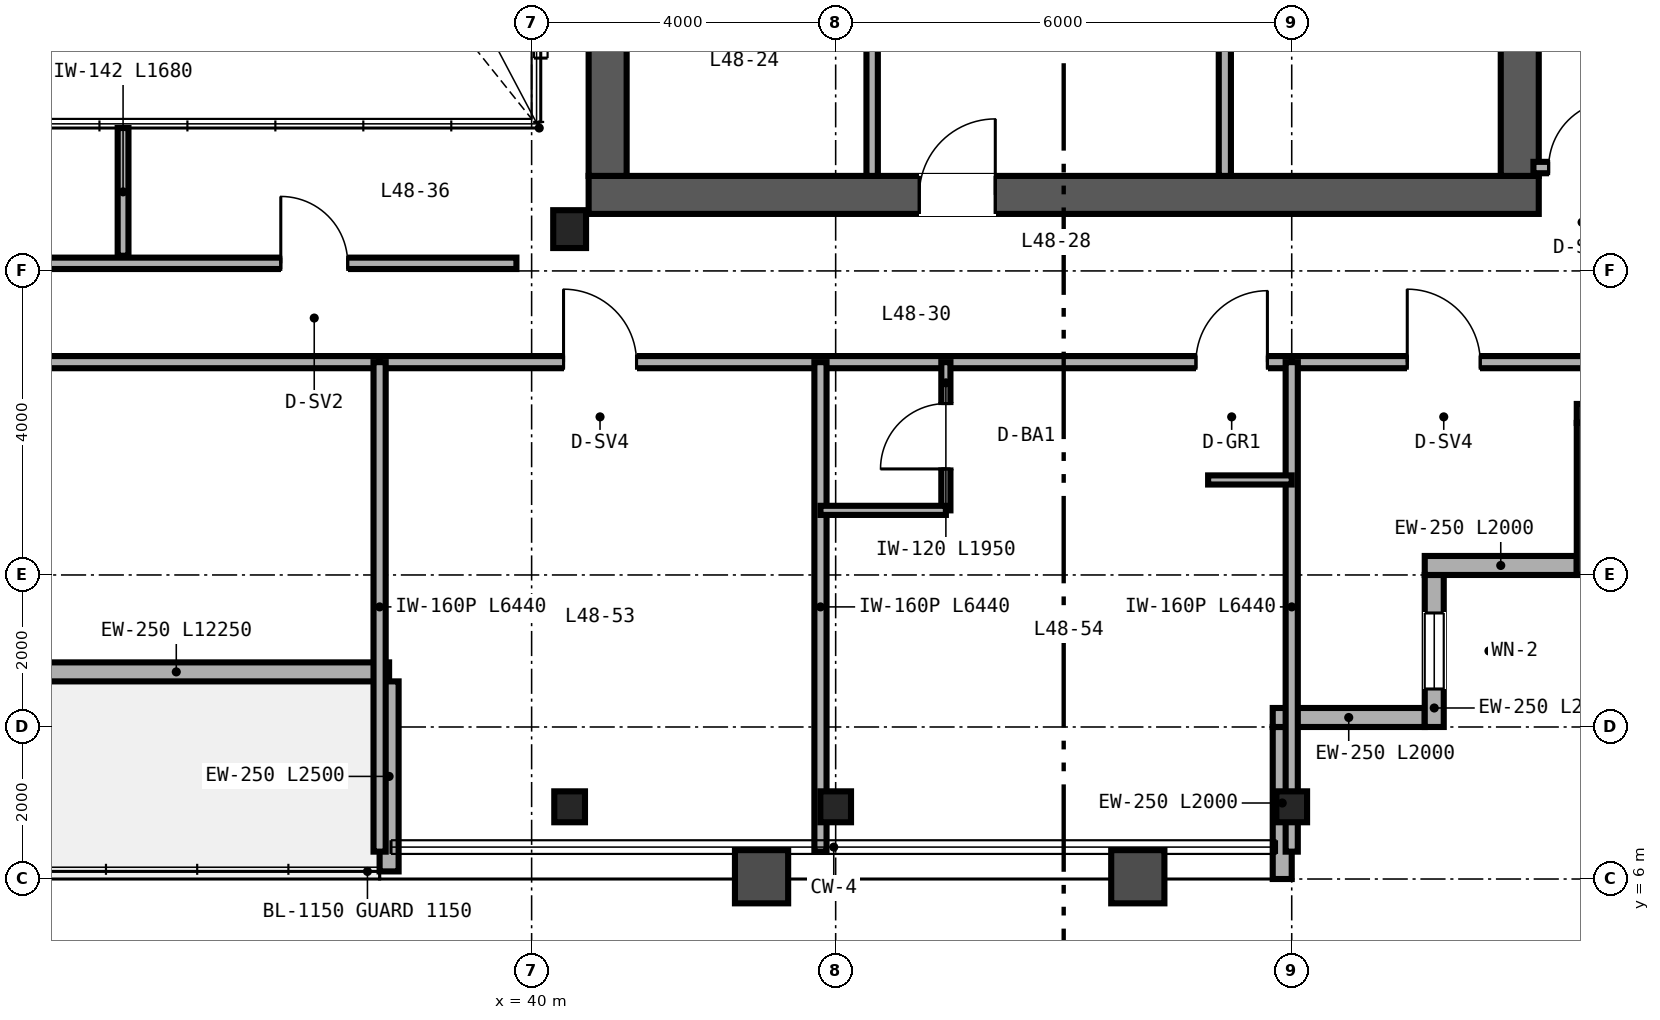
"""IFC4 building model, lengths in metres.
Left out: names, types, materials, properties, quantities, classifications, styles, units other than length and angle.
Written with IfcOpenShell. Run it as: python <this file> out.ifc"""

import sys

from ifc_helpers import new_model, si_unit, direction, frame, frame_2d, origin, origin_2d, place, context, subcontext, project, spatial, rectangle, i_section, extrude, source, transform, mapped, element, fill, save


model = new_model("IFC4")
c1 = context("Model", 3, precision=1e-05, world=origin(), true_north=direction((0.0, 1.0)))
c2 = subcontext(c1, "Body", "Model", "MODEL_VIEW")
j1 = project(units=[si_unit("LENGTHUNIT", "METRE"), si_unit("PLANEANGLEUNIT", "RADIAN")], contexts=[c1])
p1 = place(None, origin())
s1 = spatial("IfcSite", under=j1, at=p1, CompositionType="ELEMENT")
p2 = place(p1, origin())
s2 = spatial("IfcBuilding", under=s1, at=p2, CompositionType="ELEMENT")
p3 = place(p2, frame((0.0, 0.0, 192.0)))
s3 = spatial("IfcBuildingStorey", under=s2, at=p3, CompositionType="ELEMENT", Elevation=192.0)
p4 = place(p3, frame((40.75, 15.0, 0.0), z_axis=(0.0, 0.0, 1.0), x_axis=(1.0, 0.0, 0.0)))
e1 = element("IfcWall", 1, at=p4, inside=s3, PredefinedType="SHEAR", context=c2, shape_type="SweptSolid", body=[
    extrude(rectangle(XDim=12.5, YDim=0.5, at=frame_2d((6.25, 0.0))), origin(), (0.0, 0.0, 1.0), 3.37),
])
p5 = place(p4, frame((4.35, 0.0, 0.0)))
e2 = element("IfcOpeningElement", 2, at=p5, cuts=e1, PredefinedType="OPENING", context=c2, shape_type="SweptSolid", body=[
    extrude(rectangle(XDim=1.0, YDim=2.15, at=frame_2d((0.5, 1.075))), frame((0.0, 0.26, 0.0), z_axis=(0.0, -1.0, 0.0), x_axis=(1.0, 0.0, 0.0)), (0.0, 0.0, 1.0), 0.52),
])
for number, where, z_axis, x_axis in (
    (3, (41.0, 15.25, 0.0), (0.0, 0.0, 1.0), (0.0, 1.0, 0.0)),
    (4, (53.0, 15.25, 0.0), (0.0, 0.0, 1.0), (0.0, 1.0, 0.0)),
):
    element("IfcWall", number, at=place(p3, frame(where, z_axis=z_axis, x_axis=x_axis)), inside=s3, PredefinedType="SHEAR", context=c2, shape_type="SweptSolid", body=[
        extrude(rectangle(XDim=21.5, YDim=0.5, at=frame_2d((10.75, 0.0))), origin(), (0.0, 0.0, 1.0), 3.37),
    ])
m1 = source(origin(), c2, "Body", "SweptSolid", [
    extrude(i_section(OverallWidth=0.432, OverallDepth=0.498, WebThickness=0.056, FlangeThickness=0.089, FilletRadius=0.025, at=origin_2d()), origin(), (0.0, 0.0, 1.0), 3.37),
])
p6 = place(p3, frame((40.5, 14.55, 0.0), z_axis=(0.0, 0.0, 1.0), x_axis=(1.0, 0.0, 0.0)))
e5 = element("IfcColumn", 5, at=p6, inside=s3, PredefinedType="COLUMN", context=c2, shape_type="MappedRepresentation", body=[
    mapped(m1, transform((0.0, 0.0, 0.0), scale=1.0)),
])
m2 = source(origin(), c2, "Body", "SweptSolid", [
    extrude(i_section(OverallWidth=0.404, OverallDepth=0.407, WebThickness=0.027, FlangeThickness=0.044, FilletRadius=0.025, at=origin_2d()), origin(), (0.0, 0.0, 1.0), 3.37),
])
for number, where, z_axis, x_axis in (
    (6, (40.5, 6.95, 0.0), (0.0, 0.0, 1.0), (1.0, 0.0, 0.0)),
    (7, (44.0, 6.95, 0.0), (0.0, 0.0, 1.0), (1.0, 0.0, 0.0)),
    (8, (50.0, 6.95, 0.0), (0.0, 0.0, 1.0), (1.0, 0.0, 0.0)),
):
    element("IfcColumn", number, at=place(p3, frame(where, z_axis=z_axis, x_axis=x_axis)), inside=s3, PredefinedType="COLUMN", context=c2, shape_type="MappedRepresentation", body=[
        mapped(m2, transform((0.0, 0.0, 0.0), scale=1.0)),
    ])
p7 = place(p3, frame((49.875, 6.0, 0.0), z_axis=(0.0, 0.0, 1.0), x_axis=(0.0, 1.0, 0.0)))
e9 = element("IfcWall", 9, at=p7, inside=s3, PredefinedType="SOLIDWALL", context=c2, shape_type="SweptSolid", body=[
    extrude(rectangle(XDim=2.0, YDim=0.25, at=frame_2d((1.0, 0.0))), origin(), (0.0, 0.0, 1.0), 2.677),
])
p8 = place(p3, frame((49.75, 8.125, 0.0), z_axis=(0.0, 0.0, 1.0), x_axis=(1.0, 0.0, 0.0)))
e10 = element("IfcWall", 10, at=p8, inside=s3, PredefinedType="SOLIDWALL", context=c2, shape_type="SweptSolid", body=[
    extrude(rectangle(XDim=2.0, YDim=0.25, at=frame_2d((1.0, 0.0))), origin(), (0.0, 0.0, 1.0), 3.37),
])
p9 = place(p3, frame((51.875, 8.0, 0.0), z_axis=(0.0, 0.0, 1.0), x_axis=(0.0, 1.0, 0.0)))
e11 = element("IfcWall", 11, at=p9, inside=s3, PredefinedType="SOLIDWALL", context=c2, shape_type="SweptSolid", body=[
    extrude(rectangle(XDim=2.0, YDim=0.25, at=frame_2d((1.0, 0.0))), origin(), (0.0, 0.0, 1.0), 3.37),
])
p10 = place(p9, frame((0.5, 0.0, 0.85)))
e12 = element("IfcOpeningElement", 12, at=p10, cuts=e11, PredefinedType="OPENING", context=c2, shape_type="SweptSolid", body=[
    extrude(rectangle(XDim=1.0, YDim=1.9, at=frame_2d((0.5, 0.95))), frame((0.0, 0.135, 0.0), z_axis=(0.0, -1.0, 0.0), x_axis=(1.0, 0.0, 0.0)), (0.0, 0.0, 1.0), 0.27),
])
for number, where, z_axis, x_axis in (
    (13, (51.75, 10.125, 0.0), (0.0, 0.0, 1.0), (1.0, 0.0, 0.0)),
    (14, (53.875, 10.0, 0.0), (0.0, 0.0, 1.0), (0.0, 1.0, 0.0)),
):
    element("IfcWall", number, at=place(p3, frame(where, z_axis=z_axis, x_axis=x_axis)), inside=s3, PredefinedType="SOLIDWALL", context=c2, shape_type="SweptSolid", body=[
        extrude(rectangle(XDim=2.0, YDim=0.25, at=frame_2d((1.0, 0.0))), origin(), (0.0, 0.0, 1.0), 3.37),
    ])
p11 = place(p3, frame((53.75, 12.125, 0.0), z_axis=(0.0, 0.0, 1.0), x_axis=(1.0, 0.0, 0.0)))
e15 = element("IfcWall", 15, at=p11, inside=s3, PredefinedType="SOLIDWALL", context=c2, shape_type="SweptSolid", body=[
    extrude(rectangle(XDim=2.25, YDim=0.25, at=frame_2d((1.125, 0.0))), origin(), (0.0, 0.0, 1.0), 3.37),
])
p12 = place(p3, frame((25.875, 8.725, 0.0), z_axis=(0.0, 0.0, 1.0), x_axis=(1.0, 0.0, 0.0)))
e16 = element("IfcWall", 16, at=p12, inside=s3, PredefinedType="SOLIDWALL", context=c2, shape_type="SweptSolid", body=[
    extrude(rectangle(XDim=12.25, YDim=0.25, at=frame_2d((6.125, 0.0))), origin(), (0.0, 0.0, 1.0), 3.37),
])
p13 = place(p12, frame((5.6, 0.0, 0.0)))
e17 = element("IfcOpeningElement", 17, at=p13, cuts=e16, PredefinedType="OPENING", context=c2, shape_type="SweptSolid", body=[
    extrude(rectangle(XDim=1.05, YDim=2.15, at=frame_2d((0.525, 1.075))), frame((0.0, 0.135, 0.0), z_axis=(0.0, -1.0, 0.0), x_axis=(1.0, 0.0, 0.0)), (0.0, 0.0, 1.0), 0.27),
])
p14 = place(p3, frame((38.125, 6.1, 0.0), z_axis=(0.0, 0.0, 1.0), x_axis=(0.0, 1.0, 0.0)))
e18 = element("IfcWall", 18, at=p14, inside=s3, PredefinedType="SOLIDWALL", context=c2, shape_type="SweptSolid", body=[
    extrude(rectangle(XDim=2.5, YDim=0.25, at=frame_2d((1.25, 0.0))), origin(), (0.0, 0.0, 1.0), 2.443),
])
p15 = place(p3, frame((49.12, 15.25, 0.0), z_axis=(0.0, 0.0, 1.0), x_axis=(0.0, 1.0, 0.0)))
e19 = element("IfcWall", 19, at=p15, inside=s3, PredefinedType="PARTITIONING", context=c2, shape_type="SweptSolid", body=[
    extrude(rectangle(XDim=16.13, YDim=0.16, at=frame_2d((8.065, 0.0))), origin(), (0.0, 0.0, 1.0), 2.443),
])
p16 = place(p15, frame((2.2, 0.0, 0.0)))
e20 = element("IfcOpeningElement", 20, at=p16, cuts=e19, PredefinedType="OPENING", context=c2, shape_type="SweptSolid", body=[
    extrude(rectangle(XDim=0.9, YDim=2.15, at=frame_2d((0.45, 1.075))), frame((0.0, 0.09, 0.0), z_axis=(0.0, -1.0, 0.0), x_axis=(1.0, 0.0, 0.0)), (0.0, 0.0, 1.0), 0.18),
])
p17 = place(p15, frame((8.2, 0.0, 0.0)))
e21 = element("IfcOpeningElement", 21, at=p17, cuts=e19, PredefinedType="OPENING", context=c2, shape_type="SweptSolid", body=[
    extrude(rectangle(XDim=0.9, YDim=2.15, at=frame_2d((0.45, 1.075))), frame((0.0, 0.09, 0.0), z_axis=(0.0, -1.0, 0.0), x_axis=(1.0, 0.0, 0.0)), (0.0, 0.0, 1.0), 0.18),
])
p18 = place(p15, frame((13.5, 0.0, 0.0)))
e22 = element("IfcOpeningElement", 22, at=p18, cuts=e19, PredefinedType="OPENING", context=c2, shape_type="SweptSolid", body=[
    extrude(rectangle(XDim=0.9, YDim=2.15, at=frame_2d((0.45, 1.075))), frame((0.0, 0.09, 0.0), z_axis=(0.0, -1.0, 0.0), x_axis=(1.0, 0.0, 0.0)), (0.0, 0.0, 1.0), 0.18),
])
p19 = place(p3, frame((44.48, 15.25, 0.0), z_axis=(0.0, 0.0, 1.0), x_axis=(0.0, 1.0, 0.0)))
e23 = element("IfcWall", 23, at=p19, inside=s3, PredefinedType="PARTITIONING", context=c2, shape_type="SweptSolid", body=[
    extrude(rectangle(XDim=11.63, YDim=0.15, at=frame_2d((5.815, 0.0))), origin(), (0.0, 0.0, 1.0), 3.37),
])
p20 = place(p19, frame((2.2, 0.0, 0.0)))
e24 = element("IfcOpeningElement", 24, at=p20, cuts=e23, PredefinedType="OPENING", context=c2, shape_type="SweptSolid", body=[
    extrude(rectangle(XDim=0.9, YDim=2.15, at=frame_2d((0.45, 1.075))), frame((0.0, 0.085, 0.0), z_axis=(0.0, -1.0, 0.0), x_axis=(1.0, 0.0, 0.0)), (0.0, 0.0, 1.0), 0.17),
])
p21 = place(p19, frame((7.87, 0.0, 0.0)))
e25 = element("IfcOpeningElement", 25, at=p21, cuts=e23, PredefinedType="OPENING", context=c2, shape_type="SweptSolid", body=[
    extrude(rectangle(XDim=0.9, YDim=2.15, at=frame_2d((0.45, 1.075))), frame((0.0, 0.085, 0.0), z_axis=(0.0, -1.0, 0.0), x_axis=(1.0, 0.0, 0.0)), (0.0, 0.0, 1.0), 0.17),
])
p22 = place(p3, frame((24.2, 14.1, 0.0), z_axis=(0.0, 0.0, 1.0), x_axis=(1.0, 0.0, 0.0)))
e26 = element("IfcWall", 26, at=p22, inside=s3, PredefinedType="PARTITIONING", context=c2, shape_type="SweptSolid", body=[
    extrude(rectangle(XDim=15.6, YDim=0.15, at=frame_2d((7.8, 0.0))), origin(), (0.0, 0.0, 1.0), 3.37),
])
p23 = place(p22, frame((2.0, 0.0, 0.0)))
e27 = element("IfcOpeningElement", 27, at=p23, cuts=e26, PredefinedType="OPENING", context=c2, shape_type="SweptSolid", body=[
    extrude(rectangle(XDim=0.88, YDim=2.15, at=frame_2d((0.44, 1.075))), frame((0.0, 0.085, 0.0), z_axis=(0.0, -1.0, 0.0), x_axis=(1.0, 0.0, 0.0)), (0.0, 0.0, 1.0), 0.17),
])
p24 = place(p22, frame((7.25, 0.0, 0.0)))
e28 = element("IfcOpeningElement", 28, at=p24, cuts=e26, PredefinedType="OPENING", context=c2, shape_type="SweptSolid", body=[
    extrude(rectangle(XDim=0.88, YDim=2.15, at=frame_2d((0.44, 1.075))), frame((0.0, 0.085, 0.0), z_axis=(0.0, -1.0, 0.0), x_axis=(1.0, 0.0, 0.0)), (0.0, 0.0, 1.0), 0.17),
])
p25 = place(p22, frame((12.5, 0.0, 0.0)))
e29 = element("IfcOpeningElement", 29, at=p25, cuts=e26, PredefinedType="OPENING", context=c2, shape_type="SweptSolid", body=[
    extrude(rectangle(XDim=0.88, YDim=2.15, at=frame_2d((0.44, 1.075))), frame((0.0, 0.085, 0.0), z_axis=(0.0, -1.0, 0.0), x_axis=(1.0, 0.0, 0.0)), (0.0, 0.0, 1.0), 0.17),
])
p26 = place(p3, frame((34.625, 14.2, 0.0), z_axis=(0.0, 0.0, 1.0), x_axis=(0.0, 1.0, 0.0)))
e30 = element("IfcWall", 30, at=p26, inside=s3, PredefinedType="PARTITIONING", context=c2, shape_type="SweptSolid", body=[
    extrude(rectangle(XDim=1.68, YDim=0.142, at=frame_2d((0.84, 0.0))), origin(), (0.0, 0.0, 1.0), 3.37),
])
p27 = place(p3, frame((53.18, 15.36, 0.0), z_axis=(0.0, 0.0, 1.0), x_axis=(1.0, 0.0, 0.0)))
e31 = element("IfcWall", 31, at=p27, inside=s3, PredefinedType="PARTITIONING", context=c2, shape_type="SweptSolid", body=[
    extrude(rectangle(XDim=2.66, YDim=0.15, at=frame_2d((1.33, 0.0))), origin(), (0.0, 0.0, 1.0), 2.591),
])
p28 = place(p27, frame((0.2, 0.0, 0.0)))
e32 = element("IfcOpeningElement", 32, at=p28, cuts=e31, PredefinedType="OPENING", context=c2, shape_type="SweptSolid", body=[
    extrude(rectangle(XDim=0.88, YDim=2.15, at=frame_2d((0.44, 1.075))), frame((0.0, 0.085, 0.0), z_axis=(0.0, -1.0, 0.0), x_axis=(1.0, 0.0, 0.0)), (0.0, 0.0, 1.0), 0.17),
])
p29 = place(p3, frame((50.0, 12.8, 0.0), z_axis=(0.0, 0.0, 1.0), x_axis=(1.0, 0.0, 0.0)))
e33 = element("IfcWall", 33, at=p29, inside=s3, PredefinedType="PARTITIONING", context=c2, shape_type="SweptSolid", body=[
    extrude(rectangle(XDim=4.0, YDim=0.16, at=frame_2d((2.0, 0.0))), origin(), (0.0, 0.0, 1.0), 3.37),
])
p30 = place(p29, frame((1.52, 0.0, 0.0)))
e34 = element("IfcOpeningElement", 34, at=p30, cuts=e33, PredefinedType="OPENING", context=c2, shape_type="SweptSolid", body=[
    extrude(rectangle(XDim=0.96, YDim=2.15, at=frame_2d((0.48, 1.075))), frame((0.0, 0.09, 0.0), z_axis=(0.0, -1.0, 0.0), x_axis=(1.0, 0.0, 0.0)), (0.0, 0.0, 1.0), 0.18),
])
p31 = place(p3, frame((26.0, 12.8, 0.0), z_axis=(0.0, 0.0, 1.0), x_axis=(1.0, 0.0, 0.0)))
e35 = element("IfcWall", 35, at=p31, inside=s3, PredefinedType="PARTITIONING", context=c2, shape_type="SweptSolid", body=[
    extrude(rectangle(XDim=12.0, YDim=0.16, at=frame_2d((6.0, 0.0))), origin(), (0.0, 0.0, 1.0), 3.37),
])
p32 = place(p31, frame((5.2, 0.0, 0.0)))
e36 = element("IfcOpeningElement", 36, at=p32, cuts=e35, PredefinedType="OPENING", context=c2, shape_type="SweptSolid", body=[
    extrude(rectangle(XDim=0.96, YDim=2.15, at=frame_2d((0.48, 1.075))), frame((0.0, 0.09, 0.0), z_axis=(0.0, -1.0, 0.0), x_axis=(1.0, 0.0, 0.0)), (0.0, 0.0, 1.0), 0.18),
])
p33 = place(p3, frame((38.0, 12.8, 0.0), z_axis=(0.0, 0.0, 1.0), x_axis=(1.0, 0.0, 0.0)))
e37 = element("IfcWall", 37, at=p33, inside=s3, PredefinedType="PARTITIONING", context=c2, shape_type="SweptSolid", body=[
    extrude(rectangle(XDim=12.0, YDim=0.16, at=frame_2d((6.0, 0.0))), origin(), (0.0, 0.0, 1.0), 2.913),
])
p34 = place(p33, frame((2.42, 0.0, 0.0)))
e38 = element("IfcOpeningElement", 38, at=p34, cuts=e37, PredefinedType="OPENING", context=c2, shape_type="SweptSolid", body=[
    extrude(rectangle(XDim=0.96, YDim=2.15, at=frame_2d((0.48, 1.075))), frame((0.0, 0.09, 0.0), z_axis=(0.0, -1.0, 0.0), x_axis=(1.0, 0.0, 0.0)), (0.0, 0.0, 1.0), 0.18),
])
p35 = place(p33, frame((10.74, 0.0, 0.0)))
e39 = element("IfcOpeningElement", 39, at=p35, cuts=e37, PredefinedType="OPENING", context=c2, shape_type="SweptSolid", body=[
    extrude(rectangle(XDim=0.94, YDim=2.15, at=frame_2d((0.47, 1.075))), frame((0.0, 0.09, 0.0), z_axis=(0.0, -1.0, 0.0), x_axis=(1.0, 0.0, 0.0)), (0.0, 0.0, 1.0), 0.18),
])
p36 = place(p3, frame((38.0, 6.36, 0.0), z_axis=(0.0, 0.0, 1.0), x_axis=(0.0, 1.0, 0.0)))
e40 = element("IfcWall", 40, at=p36, inside=s3, PredefinedType="PARTITIONING", context=c2, shape_type="SweptSolid", body=[
    extrude(rectangle(XDim=6.44, YDim=0.16, at=frame_2d((3.22, 0.0))), origin(), (0.0, 0.0, 1.0), 2.443),
])
for number, where, z_axis, x_axis in (
    (41, (50.0, 6.36, 0.0), (0.0, 0.0, 1.0), (0.0, 1.0, 0.0)),
    (42, (43.8, 6.36, 0.0), (0.0, 0.0, 1.0), (0.0, 1.0, 0.0)),
):
    element("IfcWall", number, at=place(p3, frame(where, z_axis=z_axis, x_axis=x_axis)), inside=s3, PredefinedType="PARTITIONING", context=c2, shape_type="SweptSolid", body=[
        extrude(rectangle(XDim=6.44, YDim=0.16, at=frame_2d((3.22, 0.0))), origin(), (0.0, 0.0, 1.0), 2.677),
    ])
p37 = place(p3, frame((45.45, 10.85, 0.0), z_axis=(0.0, 0.0, 1.0), x_axis=(0.0, 1.0, 0.0)))
e43 = element("IfcWall", 43, at=p37, inside=s3, PredefinedType="PARTITIONING", context=c2, shape_type="SweptSolid", body=[
    extrude(rectangle(XDim=1.95, YDim=0.12, at=frame_2d((0.975, 0.0))), origin(), (0.0, 0.0, 1.0), 3.37),
])
p38 = place(p37, frame((0.545, 0.0, 0.0)))
e44 = element("IfcOpeningElement", 44, at=p38, cuts=e43, PredefinedType="OPENING", context=c2, shape_type="SweptSolid", body=[
    extrude(rectangle(XDim=0.86, YDim=2.1, at=frame_2d((0.43, 1.05))), frame((0.0, 0.07, 0.0), z_axis=(0.0, -1.0, 0.0), x_axis=(1.0, 0.0, 0.0)), (0.0, 0.0, 1.0), 0.14),
])
p39 = place(p3, frame((43.8, 10.85, 0.0), z_axis=(0.0, 0.0, 1.0), x_axis=(1.0, 0.0, 0.0)))
e45 = element("IfcWall", 45, at=p39, inside=s3, PredefinedType="PARTITIONING", context=c2, shape_type="SweptSolid", body=[
    extrude(rectangle(XDim=1.65, YDim=0.12, at=frame_2d((0.825, 0.0))), origin(), (0.0, 0.0, 1.0), 3.37),
])
p40 = place(p3, frame((48.9, 11.25, 0.0), z_axis=(0.0, 0.0, 1.0), x_axis=(1.0, 0.0, 0.0)))
e46 = element("IfcWall", 46, at=p40, inside=s3, PredefinedType="PARTITIONING", context=c2, shape_type="SweptSolid", body=[
    extrude(rectangle(XDim=1.1, YDim=0.12, at=frame_2d((0.55, 0.0))), origin(), (0.0, 0.0, 1.0), 3.37),
])
m3 = source(origin(), c2, "Body", "SweptSolid", [
    extrude(rectangle(XDim=1.0, YDim=1.9, at=frame_2d((0.5, 0.95))), frame((0.0, 0.03, 0.0), z_axis=(0.0, -1.0, 0.0), x_axis=(1.0, 0.0, 0.0)), (0.0, 0.0, 1.0), 0.06),
])
p41 = place(p10, origin())
e47 = element("IfcWindow", 47, at=p41, inside=s3, PartitioningType="SINGLE_PANEL", PredefinedType="WINDOW", context=c2, shape_type="MappedRepresentation", body=[
    mapped(m3, transform((0.0, 0.0, 0.0), scale=1.0)),
])
fill(e12, e47)
m4 = source(origin(), c2, "Body", "SweptSolid", [
    extrude(rectangle(XDim=1.0, YDim=2.15, at=frame_2d((0.5, 1.075))), frame((0.0, 0.025, 0.0), z_axis=(0.0, -1.0, 0.0), x_axis=(1.0, 0.0, 0.0)), (0.0, 0.0, 1.0), 0.05),
])
p42 = place(p5, origin())
e48 = element("IfcDoor", 48, at=p42, inside=s3, OperationType="SINGLE_SWING_RIGHT", PredefinedType="DOOR", context=c2, shape_type="MappedRepresentation", body=[
    mapped(m4, transform((0.0, 0.0, 0.0), scale=1.0)),
])
fill(e2, e48)
m5 = source(origin(), c2, "Body", "SweptSolid", [
    extrude(rectangle(XDim=0.88, YDim=2.15, at=frame_2d((0.44, 1.075))), frame((0.0, 0.025, 0.0), z_axis=(0.0, -1.0, 0.0), x_axis=(1.0, 0.0, 0.0)), (0.0, 0.0, 1.0), 0.05),
])
p43 = place(p25, origin())
e49 = element("IfcDoor", 49, at=p43, inside=s3, OperationType="SINGLE_SWING_LEFT", PredefinedType="DOOR", context=c2, shape_type="MappedRepresentation", body=[
    mapped(m5, transform((0.0, 0.0, 0.0), scale=1.0)),
])
fill(e29, e49)
p44 = place(p28, origin())
e50 = element("IfcDoor", 50, at=p44, inside=s3, OperationType="SINGLE_SWING_RIGHT", PredefinedType="DOOR", context=c2, shape_type="MappedRepresentation", body=[
    mapped(m5, transform((0.0, 0.0, 0.0), scale=1.0)),
])
fill(e32, e50)
m6 = source(origin(), c2, "Body", "SweptSolid", [
    extrude(rectangle(XDim=0.96, YDim=2.15, at=frame_2d((0.48, 1.075))), frame((0.0, 0.025, 0.0), z_axis=(0.0, -1.0, 0.0), x_axis=(1.0, 0.0, 0.0)), (0.0, 0.0, 1.0), 0.05),
])
p45 = place(p30, origin())
e51 = element("IfcDoor", 51, at=p45, inside=s3, OperationType="SINGLE_SWING_LEFT", PredefinedType="DOOR", context=c2, shape_type="MappedRepresentation", body=[
    mapped(m6, transform((0.0, 0.0, 0.0), scale=1.0)),
])
fill(e34, e51)
m7 = source(origin(), c2, "Body", "SweptSolid", [
    extrude(rectangle(XDim=0.86, YDim=2.1, at=frame_2d((0.43, 1.05))), frame((0.0, 0.025, 0.0), z_axis=(0.0, -1.0, 0.0), x_axis=(1.0, 0.0, 0.0)), (0.0, 0.0, 1.0), 0.05),
])
p46 = place(p38, origin())
e52 = element("IfcDoor", 52, at=p46, inside=s3, OperationType="SINGLE_SWING_LEFT", PredefinedType="DOOR", context=c2, shape_type="MappedRepresentation", body=[
    mapped(m7, transform((0.0, 0.0, 0.0), scale=1.0)),
])
fill(e44, e52)
p47 = place(p34, origin())
e53 = element("IfcDoor", 53, at=p47, inside=s3, OperationType="SINGLE_SWING_LEFT", PredefinedType="DOOR", context=c2, shape_type="MappedRepresentation", body=[
    mapped(m6, transform((0.0, 0.0, 0.0), scale=1.0)),
])
fill(e38, e53)
m8 = source(origin(), c2, "Body", "SweptSolid", [
    extrude(rectangle(XDim=0.94, YDim=2.15, at=frame_2d((0.47, 1.075))), frame((0.0, 0.025, 0.0), z_axis=(0.0, -1.0, 0.0), x_axis=(1.0, 0.0, 0.0)), (0.0, 0.0, 1.0), 0.05),
])
p48 = place(p35, origin())
e54 = element("IfcDoor", 54, at=p48, inside=s3, OperationType="SINGLE_SWING_RIGHT", PredefinedType="DOOR", context=c2, shape_type="MappedRepresentation", body=[
    mapped(m8, transform((0.0, 0.0, 0.0), scale=1.0)),
])
fill(e39, e54)
save(model, sys.argv[1])
